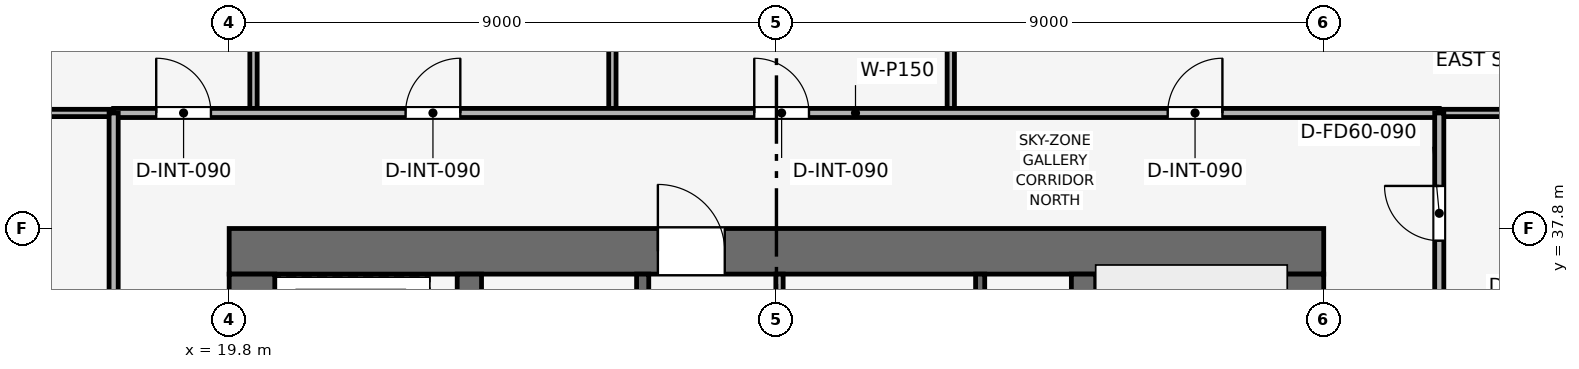
"""IFC4 building model, lengths in metres.
Left out: names, types, materials, properties, quantities, classifications, styles, units other than length and angle.
Written with IfcOpenShell. Run it as: python <this file> out.ifc"""

import sys

from ifc_helpers import new_model, si_unit, direction, frame, frame_2d, origin, place, context, subcontext, project, spatial, rectangle, extrude, element, fill, save


model = new_model("IFC4")
c1 = context("Model", 3, precision=1e-05, world=origin(), true_north=direction((0.0, 1.0)))
c2 = subcontext(c1, "Body", "Model", "MODEL_VIEW")
j1 = project(units=[si_unit("LENGTHUNIT", "METRE"), si_unit("PLANEANGLEUNIT", "RADIAN")], contexts=[c1])
p1 = place(None, origin())
s1 = spatial("IfcSite", under=j1, at=p1, CompositionType="ELEMENT")
p2 = place(p1, origin())
s2 = spatial("IfcBuilding", under=s1, at=p2, CompositionType="ELEMENT")
p3 = place(p2, frame((0.0, 0.0, 269.1)))
s3 = spatial("IfcBuildingStorey", under=s2, at=p3, CompositionType="ELEMENT", Elevation=269.1)
p4 = place(p3, frame((19.8, 37.425, 0.0), z_axis=(0.0, 0.0, 1.0), x_axis=(1.0, 0.0, 0.0)))
e1 = element("IfcWall", 1, at=p4, inside=s3, PredefinedType="SHEAR", context=c2, shape_type="SweptSolid", body=[
    extrude(rectangle(XDim=18.0, YDim=0.75, at=frame_2d((9.0, 0.0))), origin(), (0.0, 0.0, 1.0), 3.75),
])
p5 = place(p4, frame((7.05, 0.0, 0.0)))
e2 = element("IfcOpeningElement", 2, at=p5, cuts=e1, PredefinedType="OPENING", context=c2, shape_type="SweptSolid", body=[
    extrude(rectangle(XDim=1.1, YDim=2.15, at=frame_2d((0.55, 1.075))), frame((0.0, 0.385, 0.0), z_axis=(0.0, -1.0, 0.0), x_axis=(1.0, 0.0, 0.0)), (0.0, 0.0, 1.0), 0.77),
])
p6 = place(p3, frame((20.175, 20.55, 0.0), z_axis=(0.0, 0.0, 1.0), x_axis=(0.0, 1.0, 0.0)))
e3 = element("IfcWall", 3, at=p6, inside=s3, PredefinedType="SHEAR", context=c2, shape_type="SweptSolid", body=[
    extrude(rectangle(XDim=16.5, YDim=0.75, at=frame_2d((8.25, 0.0))), origin(), (0.0, 0.0, 1.0), 3.75),
])
p7 = place(p6, frame((10.25, 0.0, 0.0)))
e4 = element("IfcOpeningElement", 4, at=p7, cuts=e3, PredefinedType="OPENING", context=c2, shape_type="SweptSolid", body=[
    extrude(rectangle(XDim=1.1, YDim=2.15, at=frame_2d((0.55, 1.075))), frame((0.0, 0.385, 0.0), z_axis=(0.0, -1.0, 0.0), x_axis=(1.0, 0.0, 0.0)), (0.0, 0.0, 1.0), 0.77),
])
p8 = place(p3, frame((37.425, 20.55, 0.0), z_axis=(0.0, 0.0, 1.0), x_axis=(0.0, 1.0, 0.0)))
e5 = element("IfcWall", 5, at=p8, inside=s3, PredefinedType="SHEAR", context=c2, shape_type="SweptSolid", body=[
    extrude(rectangle(XDim=16.5, YDim=0.75, at=frame_2d((8.25, 0.0))), origin(), (0.0, 0.0, 1.0), 3.75),
])
p9 = place(p8, frame((4.75, 0.0, 0.0)))
e6 = element("IfcOpeningElement", 6, at=p9, cuts=e5, PredefinedType="OPENING", context=c2, shape_type="SweptSolid", body=[
    extrude(rectangle(XDim=1.1, YDim=2.15, at=frame_2d((0.55, 1.075))), frame((0.0, 0.385, 0.0), z_axis=(0.0, -1.0, 0.0), x_axis=(1.0, 0.0, 0.0)), (0.0, 0.0, 1.0), 0.77),
])
for number, where, z_axis, x_axis in (
    (7, (23.75, 20.55, 0.0), (0.0, 0.0, 1.0), (0.0, 1.0, 0.0)),
    (8, (33.85, 20.55, 0.0), (0.0, 0.0, 1.0), (0.0, 1.0, 0.0)),
):
    element("IfcWall", number, at=place(p3, frame(where, z_axis=z_axis, x_axis=x_axis)), inside=s3, PredefinedType="SHEAR", context=c2, shape_type="SweptSolid", body=[
        extrude(rectangle(XDim=16.5, YDim=0.4, at=frame_2d((8.25, 0.0))), origin(), (0.0, 0.0, 1.0), 3.75),
    ])
p10 = place(p3, frame((32.15, 34.0, 0.0), z_axis=(0.0, 0.0, 1.0), x_axis=(0.0, 1.0, 0.0)))
e9 = element("IfcWall", 9, at=p10, inside=s3, PredefinedType="SHEAR", context=c2, shape_type="SweptSolid", body=[
    extrude(rectangle(XDim=3.05, YDim=0.15, at=frame_2d((1.525, 0.0))), origin(), (0.0, 0.0, 1.0), 3.5),
])
p11 = place(p3, frame((26.6, 34.0, 0.0), z_axis=(0.0, 0.0, 1.0), x_axis=(0.0, 1.0, 0.0)))
e10 = element("IfcWall", 10, at=p11, inside=s3, PredefinedType="SHEAR", context=c2, shape_type="SweptSolid", body=[
    extrude(rectangle(XDim=3.05, YDim=0.2, at=frame_2d((1.525, 0.0))), origin(), (0.0, 0.0, 1.0), 3.5),
])
p12 = place(p11, frame((0.75, 0.0, 0.0)))
e11 = element("IfcOpeningElement", 11, at=p12, cuts=e10, PredefinedType="OPENING", context=c2, shape_type="SweptSolid", body=[
    extrude(rectangle(XDim=1.1, YDim=2.15, at=frame_2d((0.55, 1.075))), frame((0.0, 0.11, 0.0), z_axis=(0.0, -1.0, 0.0), x_axis=(1.0, 0.0, 0.0)), (0.0, 0.0, 1.0), 0.22),
])
p13 = place(p3, frame((28.85, 33.925, 0.0), z_axis=(0.0, 0.0, 1.0), x_axis=(0.0, 1.0, 0.0)))
e12 = element("IfcWall", 12, at=p13, inside=s3, PredefinedType="PARTITIONING", context=c2, shape_type="SweptSolid", body=[
    extrude(rectangle(XDim=3.125, YDim=0.12, at=frame_2d((1.562, 0.0))), origin(), (0.0, 0.0, 1.0), 3.5),
])
p14 = place(p13, frame((0.25, 0.0, 0.0)))
e13 = element("IfcOpeningElement", 13, at=p14, cuts=e12, PredefinedType="OPENING", context=c2, shape_type="SweptSolid", body=[
    extrude(rectangle(XDim=0.85, YDim=2.1, at=frame_2d((0.425, 1.05))), frame((0.0, 0.07, 0.0), z_axis=(0.0, -1.0, 0.0), x_axis=(1.0, 0.0, 0.0)), (0.0, 0.0, 1.0), 0.14),
])
p15 = place(p13, frame((1.72, 0.0, 0.0)))
e14 = element("IfcOpeningElement", 14, at=p15, cuts=e12, PredefinedType="OPENING", context=c2, shape_type="SweptSolid", body=[
    extrude(rectangle(XDim=0.85, YDim=2.1, at=frame_2d((0.425, 1.05))), frame((0.0, 0.07, 0.0), z_axis=(0.0, -1.0, 0.0), x_axis=(1.0, 0.0, 0.0)), (0.0, 0.0, 1.0), 0.14),
])
for number, where, z_axis, x_axis in (
    (15, (20.2, 39.7, 0.0), (0.0, 0.0, 1.0), (0.0, 1.0, 0.0)),
    (16, (26.102, 39.7, 0.0), (0.0, 0.0, 1.0), (0.0, 1.0, 0.0)),
    (17, (31.667, 39.7, 0.0), (0.0, 0.0, 1.0), (0.0, 1.0, 0.0)),
):
    element("IfcWall", number, at=place(p3, frame(where, z_axis=z_axis, x_axis=x_axis)), inside=s3, PredefinedType="PARTITIONING", context=c2, shape_type="SweptSolid", body=[
        extrude(rectangle(XDim=13.87, YDim=0.12, at=frame_2d((6.935, 0.0))), origin(), (0.0, 0.0, 1.0), 3.085),
    ])
p16 = place(p3, frame((4.03, 39.7, 0.0), z_axis=(0.0, 0.0, 1.0), x_axis=(1.0, 0.0, 0.0)))
e18 = element("IfcWall", 18, at=p16, inside=s3, PredefinedType="PARTITIONING", context=c2, shape_type="SweptSolid", body=[
    extrude(rectangle(XDim=13.87, YDim=0.12, at=frame_2d((6.935, 0.0))), origin(), (0.0, 0.0, 1.0), 3.085),
])
p17 = place(p3, frame((39.7, 39.7, 0.0), z_axis=(0.0, 0.0, 1.0), x_axis=(1.0, 0.0, 0.0)))
e19 = element("IfcWall", 19, at=p17, inside=s3, PredefinedType="PARTITIONING", context=c2, shape_type="SweptSolid", body=[
    extrude(rectangle(XDim=13.87, YDim=0.12, at=frame_2d((6.935, 0.0))), origin(), (0.0, 0.0, 1.0), 3.085),
])
p18 = place(p3, frame((17.9, 39.7, 0.0), z_axis=(0.0, 0.0, 1.0), x_axis=(1.0, 0.0, 0.0)))
e20 = element("IfcWall", 20, at=p18, inside=s3, PredefinedType="PARTITIONING", context=c2, shape_type="SweptSolid", body=[
    extrude(rectangle(XDim=21.8, YDim=0.15, at=frame_2d((10.9, 0.0))), origin(), (0.0, 0.0, 1.0), 3.085),
])
p19 = place(p18, frame((0.7, 0.0, 0.0)))
e21 = element("IfcOpeningElement", 21, at=p19, cuts=e20, PredefinedType="OPENING", context=c2, shape_type="SweptSolid", body=[
    extrude(rectangle(XDim=0.9, YDim=2.1, at=frame_2d((0.45, 1.05))), frame((0.0, 0.085, 0.0), z_axis=(0.0, -1.0, 0.0), x_axis=(1.0, 0.0, 0.0)), (0.0, 0.0, 1.0), 0.17),
])
p20 = place(p18, frame((4.801, 0.0, 0.0)))
e22 = element("IfcOpeningElement", 22, at=p20, cuts=e20, PredefinedType="OPENING", context=c2, shape_type="SweptSolid", body=[
    extrude(rectangle(XDim=0.9, YDim=2.1, at=frame_2d((0.45, 1.05))), frame((0.0, 0.085, 0.0), z_axis=(0.0, -1.0, 0.0), x_axis=(1.0, 0.0, 0.0)), (0.0, 0.0, 1.0), 0.17),
])
p21 = place(p18, frame((10.535, 0.0, 0.0)))
e23 = element("IfcOpeningElement", 23, at=p21, cuts=e20, PredefinedType="OPENING", context=c2, shape_type="SweptSolid", body=[
    extrude(rectangle(XDim=0.9, YDim=2.1, at=frame_2d((0.45, 1.05))), frame((0.0, 0.085, 0.0), z_axis=(0.0, -1.0, 0.0), x_axis=(1.0, 0.0, 0.0)), (0.0, 0.0, 1.0), 0.17),
])
p22 = place(p18, frame((17.334, 0.0, 0.0)))
e24 = element("IfcOpeningElement", 24, at=p22, cuts=e20, PredefinedType="OPENING", context=c2, shape_type="SweptSolid", body=[
    extrude(rectangle(XDim=0.9, YDim=2.1, at=frame_2d((0.45, 1.05))), frame((0.0, 0.085, 0.0), z_axis=(0.0, -1.0, 0.0), x_axis=(1.0, 0.0, 0.0)), (0.0, 0.0, 1.0), 0.17),
])
p23 = place(p3, frame((17.9, 10.8, 0.0), z_axis=(0.0, 0.0, 1.0), x_axis=(0.0, 1.0, 0.0)))
e25 = element("IfcWall", 25, at=p23, inside=s3, PredefinedType="PARTITIONING", context=c2, shape_type="SweptSolid", body=[
    extrude(rectangle(XDim=28.9, YDim=0.15, at=frame_2d((14.45, 0.0))), origin(), (0.0, 0.0, 1.0), 3.085),
])
p24 = place(p23, frame((0.7, 0.0, 0.0)))
e26 = element("IfcOpeningElement", 26, at=p24, cuts=e25, PredefinedType="OPENING", context=c2, shape_type="SweptSolid", body=[
    extrude(rectangle(XDim=0.9, YDim=2.1, at=frame_2d((0.45, 1.05))), frame((0.0, 0.085, 0.0), z_axis=(0.0, -1.0, 0.0), x_axis=(1.0, 0.0, 0.0)), (0.0, 0.0, 1.0), 0.17),
])
p25 = place(p23, frame((7.828, 0.0, 0.0)))
e27 = element("IfcOpeningElement", 27, at=p25, cuts=e25, PredefinedType="OPENING", context=c2, shape_type="SweptSolid", body=[
    extrude(rectangle(XDim=0.9, YDim=2.1, at=frame_2d((0.45, 1.05))), frame((0.0, 0.085, 0.0), z_axis=(0.0, -1.0, 0.0), x_axis=(1.0, 0.0, 0.0)), (0.0, 0.0, 1.0), 0.17),
])
p26 = place(p23, frame((21.127, 0.0, 0.0)))
e28 = element("IfcOpeningElement", 28, at=p26, cuts=e25, PredefinedType="OPENING", context=c2, shape_type="SweptSolid", body=[
    extrude(rectangle(XDim=0.9, YDim=2.1, at=frame_2d((0.45, 1.05))), frame((0.0, 0.085, 0.0), z_axis=(0.0, -1.0, 0.0), x_axis=(1.0, 0.0, 0.0)), (0.0, 0.0, 1.0), 0.17),
])
p27 = place(p3, frame((39.7, 24.4, 0.0), z_axis=(0.0, 0.0, 1.0), x_axis=(0.0, 1.0, 0.0)))
e29 = element("IfcWall", 29, at=p27, inside=s3, PredefinedType="PARTITIONING", context=c2, shape_type="SweptSolid", body=[
    extrude(rectangle(XDim=15.3, YDim=0.15, at=frame_2d((7.65, 0.0))), origin(), (0.0, 0.0, 1.0), 3.085),
])
p28 = place(p27, frame((1.35, 0.0, 0.0)))
e30 = element("IfcOpeningElement", 30, at=p28, cuts=e29, PredefinedType="OPENING", context=c2, shape_type="SweptSolid", body=[
    extrude(rectangle(XDim=0.9, YDim=2.1, at=frame_2d((0.45, 1.05))), frame((0.0, 0.085, 0.0), z_axis=(0.0, -1.0, 0.0), x_axis=(1.0, 0.0, 0.0)), (0.0, 0.0, 1.0), 0.17),
])
p29 = place(p27, frame((4.55, 0.0, 0.0)))
e31 = element("IfcOpeningElement", 31, at=p29, cuts=e29, PredefinedType="OPENING", context=c2, shape_type="SweptSolid", body=[
    extrude(rectangle(XDim=0.9, YDim=2.1, at=frame_2d((0.45, 1.05))), frame((0.0, 0.085, 0.0), z_axis=(0.0, -1.0, 0.0), x_axis=(1.0, 0.0, 0.0)), (0.0, 0.0, 1.0), 0.17),
])
p30 = place(p27, frame((7.45, 0.0, 0.0)))
e32 = element("IfcOpeningElement", 32, at=p30, cuts=e29, PredefinedType="OPENING", context=c2, shape_type="SweptSolid", body=[
    extrude(rectangle(XDim=0.9, YDim=2.1, at=frame_2d((0.45, 1.05))), frame((0.0, 0.085, 0.0), z_axis=(0.0, -1.0, 0.0), x_axis=(1.0, 0.0, 0.0)), (0.0, 0.0, 1.0), 0.17),
])
p31 = place(p27, frame((10.2, 0.0, 0.0)))
e33 = element("IfcOpeningElement", 33, at=p31, cuts=e29, PredefinedType="OPENING", context=c2, shape_type="SweptSolid", body=[
    extrude(rectangle(XDim=0.95, YDim=2.1, at=frame_2d((0.475, 1.05))), frame((0.0, 0.085, 0.0), z_axis=(0.0, -1.0, 0.0), x_axis=(1.0, 0.0, 0.0)), (0.0, 0.0, 1.0), 0.17),
])
p32 = place(p27, frame((13.2, 0.0, 0.0)))
e34 = element("IfcOpeningElement", 34, at=p32, cuts=e29, PredefinedType="OPENING", context=c2, shape_type="SweptSolid", body=[
    extrude(rectangle(XDim=0.9, YDim=2.1, at=frame_2d((0.45, 1.05))), frame((0.0, 0.085, 0.0), z_axis=(0.0, -1.0, 0.0), x_axis=(1.0, 0.0, 0.0)), (0.0, 0.0, 1.0), 0.17),
])
p33 = place(p19, origin())
e35 = element("IfcDoor", 35, at=p33, inside=s3, OperationType="SINGLE_SWING_LEFT", PredefinedType="DOOR", context=c2, shape_type="SweptSolid", body=[
    extrude(rectangle(XDim=0.9, YDim=2.1, at=frame_2d((0.45, 1.05))), frame((0.0, 0.025, 0.0), z_axis=(0.0, -1.0, 0.0), x_axis=(1.0, 0.0, 0.0)), (0.0, 0.0, 1.0), 0.05),
])
fill(e21, e35)
p34 = place(p20, origin())
e36 = element("IfcDoor", 36, at=p34, inside=s3, OperationType="SINGLE_SWING_RIGHT", PredefinedType="DOOR", context=c2, shape_type="SweptSolid", body=[
    extrude(rectangle(XDim=0.9, YDim=2.1, at=frame_2d((0.45, 1.05))), frame((0.0, 0.025, 0.0), z_axis=(0.0, -1.0, 0.0), x_axis=(1.0, 0.0, 0.0)), (0.0, 0.0, 1.0), 0.05),
])
fill(e22, e36)
p35 = place(p21, origin())
e37 = element("IfcDoor", 37, at=p35, inside=s3, OperationType="SINGLE_SWING_LEFT", PredefinedType="DOOR", context=c2, shape_type="SweptSolid", body=[
    extrude(rectangle(XDim=0.9, YDim=2.1, at=frame_2d((0.45, 1.05))), frame((0.0, 0.025, 0.0), z_axis=(0.0, -1.0, 0.0), x_axis=(1.0, 0.0, 0.0)), (0.0, 0.0, 1.0), 0.05),
])
fill(e23, e37)
p36 = place(p22, origin())
e38 = element("IfcDoor", 38, at=p36, inside=s3, OperationType="SINGLE_SWING_RIGHT", PredefinedType="DOOR", context=c2, shape_type="SweptSolid", body=[
    extrude(rectangle(XDim=0.9, YDim=2.1, at=frame_2d((0.45, 1.05))), frame((0.0, 0.025, 0.0), z_axis=(0.0, -1.0, 0.0), x_axis=(1.0, 0.0, 0.0)), (0.0, 0.0, 1.0), 0.05),
])
fill(e24, e38)
p37 = place(p32, origin())
e39 = element("IfcDoor", 39, at=p37, inside=s3, OperationType="SINGLE_SWING_RIGHT", PredefinedType="DOOR", context=c2, shape_type="SweptSolid", body=[
    extrude(rectangle(XDim=0.9, YDim=2.1, at=frame_2d((0.45, 1.05))), frame((0.0, 0.025, 0.0), z_axis=(0.0, -1.0, 0.0), x_axis=(1.0, 0.0, 0.0)), (0.0, 0.0, 1.0), 0.05),
])
fill(e34, e39)
p38 = place(p5, origin())
e40 = element("IfcDoor", 40, at=p38, inside=s3, OperationType="SINGLE_SWING_LEFT", PredefinedType="DOOR", context=c2, shape_type="SweptSolid", body=[
    extrude(rectangle(XDim=1.1, YDim=2.15, at=frame_2d((0.55, 1.075))), frame((0.0, 0.025, 0.0), z_axis=(0.0, -1.0, 0.0), x_axis=(1.0, 0.0, 0.0)), (0.0, 0.0, 1.0), 0.05),
])
fill(e2, e40)
save(model, sys.argv[1])
